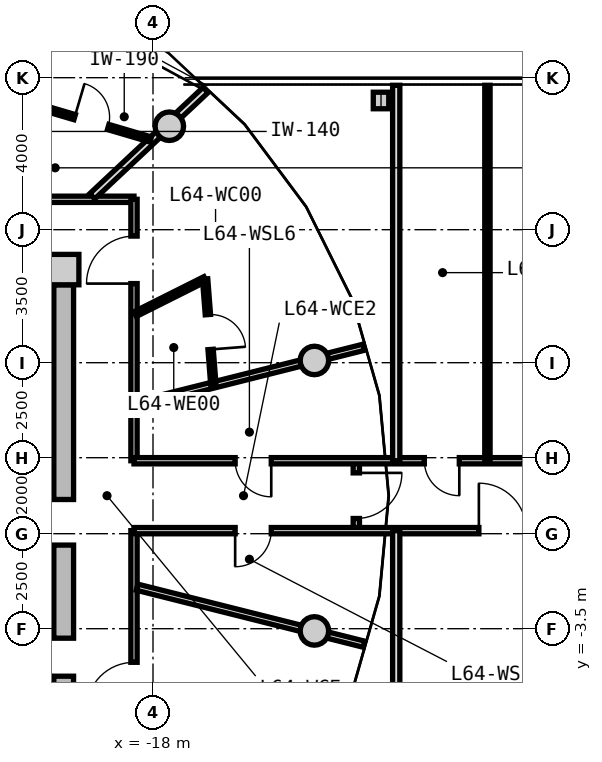
"""IFC4 building model, lengths in metres.
Left out: names, types, materials, properties, quantities, classifications, styles, units other than length and angle.
Written with IfcOpenShell. Run it as: python <this file> out.ifc"""

import sys

from ifc_helpers import new_model, si_unit, direction, frame, frame_2d, origin, origin_2d, place, context, subcontext, project, spatial, rectangle, circle, i_section, extrude, source, transform, mapped, element, fill, save


model = new_model("IFC4")
c1 = context("Model", 3, precision=1e-05, world=origin(), true_north=direction((0.0, 1.0)))
c2 = subcontext(c1, "Body", "Model", "MODEL_VIEW")
j1 = project(units=[si_unit("LENGTHUNIT", "METRE"), si_unit("PLANEANGLEUNIT", "RADIAN")], contexts=[c1])
p1 = place(None, origin())
s1 = spatial("IfcSite", under=j1, at=p1, CompositionType="ELEMENT")
p2 = place(p1, origin())
s2 = spatial("IfcBuilding", under=s1, at=p2, CompositionType="ELEMENT")
p3 = place(p2, frame((0.0, 0.0, 207.8)))
s3 = spatial("IfcBuildingStorey", under=s2, at=p3, CompositionType="ELEMENT", Elevation=207.8)
m1 = source(origin(), c2, "Body", "SweptSolid", [
    extrude(rectangle(XDim=0.8, YDim=0.8, at=origin_2d()), origin(), (0.0, 0.0, 1.0), 3.05),
])
p4 = place(p3, frame((-20.35, 5.95, 0.0), z_axis=(0.0, 0.0, 1.0), x_axis=(1.0, 0.0, 0.0)))
e1 = element("IfcColumn", 1, at=p4, inside=s3, PredefinedType="COLUMN", context=c2, shape_type="MappedRepresentation", body=[
    mapped(m1, transform((0.0, 0.0, 0.0), x_axis=(1.0, 0.0, 0.0), y_axis=(0.0, 1.0, 0.0), z_axis=(0.0, 0.0, 1.0), scale=1.0)),
])
m2 = source(origin(), c2, "Body", "SweptSolid", [
    extrude(rectangle(XDim=11.1, YDim=0.52, at=frame_2d((5.55, 0.0))), origin(), (0.0, 0.0, 1.0), 2.76),
])
p5 = place(p3, frame((-20.35, 5.55, 0.0), z_axis=(0.0, 0.0, 1.0), x_axis=(0.0, -1.0, 0.0)))
e2 = element("IfcWall", 2, at=p5, inside=s3, PredefinedType="SHEAR", context=c2, shape_type="MappedRepresentation", body=[
    mapped(m2, transform((0.0, 0.0, 0.0), x_axis=(1.0, 0.0, 0.0), y_axis=(0.0, 1.0, 0.0), z_axis=(0.0, 0.0, 1.0), scale=1.0)),
])
p6 = place(p5, frame((5.65, 0.0, 0.0)))
e3 = element("IfcOpeningElement", 3, at=p6, cuts=e2, PredefinedType="OPENING", context=c2, shape_type="SweptSolid", body=[
    extrude(rectangle(XDim=1.2, YDim=2.15, at=frame_2d((0.6, 1.075))), frame((0.0, 0.27, 0.0), z_axis=(0.0, -1.0, 0.0), x_axis=(1.0, 0.0, 0.0)), (0.0, 0.0, 1.0), 0.54),
])
p7 = place(p5, frame((9.3, 0.0, 0.0)))
e4 = element("IfcOpeningElement", 4, at=p7, cuts=e2, PredefinedType="OPENING", context=c2, shape_type="SweptSolid", body=[
    extrude(rectangle(XDim=1.0, YDim=2.1, at=frame_2d((0.5, 1.05))), frame((0.0, 0.27, 0.0), z_axis=(0.0, -1.0, 0.0), x_axis=(1.0, 0.0, 0.0)), (0.0, 0.0, 1.0), 0.54),
])
m3 = source(origin(), c2, "Body", "SweptSolid", [
    extrude(circle(Radius=0.375, at=origin_2d()), origin(), (0.0, 0.0, 1.0), 3.05),
])
for number, where, z_axis, x_axis in (
    (5, (-13.753, 3.559, 0.0), (0.0, 0.0, 1.0), (1.0, 0.0, 0.0)),
    (6, (-17.57, 9.723, 0.0), (0.0, 0.0, 1.0), (1.0, 0.0, 0.0)),
    (7, (-13.753, -3.559, 0.0), (0.0, 0.0, 1.0), (1.0, 0.0, 0.0)),
):
    element("IfcColumn", number, at=place(p3, frame(where, z_axis=z_axis, x_axis=x_axis)), inside=s3, PredefinedType="COLUMN", context=c2, shape_type="MappedRepresentation", body=[
        mapped(m3, transform((0.0, 0.0, 0.0), x_axis=(1.0, 0.0, 0.0), y_axis=(0.0, 1.0, 0.0), z_axis=(0.0, 0.0, 1.0), scale=1.0)),
    ])
m4 = source(origin(), c2, "Body", "SweptSolid", [
    extrude(i_section(OverallWidth=0.407, OverallDepth=0.435, WebThickness=0.024, FlangeThickness=0.039, FilletRadius=0.015, at=origin_2d()), origin(), (0.0, 0.0, 1.0), 3.05),
])
p8 = place(p3, frame((-12.0, 10.4, 0.0), z_axis=(0.0, 0.0, 1.0), x_axis=(1.0, 0.0, 0.0)))
e8 = element("IfcColumn", 8, at=p8, inside=s3, PredefinedType="COLUMN", context=c2, shape_type="MappedRepresentation", body=[
    mapped(m4, transform((0.0, 0.0, 0.0), x_axis=(1.0, 0.0, 0.0), y_axis=(0.0, 1.0, 0.0), z_axis=(0.0, 0.0, 1.0), scale=1.0)),
])
m5 = source(origin(), c2, "Body", "SweptSolid", [
    extrude(rectangle(XDim=8.58, YDim=0.165, at=frame_2d((4.29, 0.0))), origin(), (0.0, 0.0, 1.0), 2.745),
])
p9 = place(p3, frame((-27.08, 7.8, 0.0), z_axis=(0.0, 0.0, 1.0), x_axis=(1.0, 0.0, 0.0)))
e9 = element("IfcWall", 9, at=p9, inside=s3, PredefinedType="PARTITIONING", context=c2, shape_type="MappedRepresentation", body=[
    mapped(m5, transform((0.0, 0.0, 0.0), x_axis=(1.0, 0.0, 0.0), y_axis=(0.0, 1.0, 0.0), z_axis=(0.0, 0.0, 1.0), scale=1.0)),
])
p10 = place(p9, frame((2.18, 0.0, 0.0)))
e10 = element("IfcOpeningElement", 10, at=p10, cuts=e9, PredefinedType="OPENING", context=c2, shape_type="SweptSolid", body=[
    extrude(rectangle(XDim=1.25, YDim=2.2, at=frame_2d((0.625, 1.1))), frame((0.0, 0.093, 0.0), z_axis=(0.0, -1.0, 0.0), x_axis=(1.0, 0.0, 0.0)), (0.0, 0.0, 1.0), 0.185),
])
m6 = source(origin(), c2, "Body", "SweptSolid", [
    extrude(rectangle(XDim=6.88, YDim=0.165, at=frame_2d((3.44, 0.0))), origin(), (0.0, 0.0, 1.0), 2.745),
])
p11 = place(p3, frame((-18.5, 7.8, 0.0), z_axis=(0.0, 0.0, 1.0), x_axis=(0.0, -1.0, 0.0)))
e11 = element("IfcWall", 11, at=p11, inside=s3, PredefinedType="PARTITIONING", context=c2, shape_type="MappedRepresentation", body=[
    mapped(m6, transform((0.0, 0.0, 0.0), x_axis=(1.0, 0.0, 0.0), y_axis=(0.0, 1.0, 0.0), z_axis=(0.0, 0.0, 1.0), scale=1.0)),
])
p12 = place(p11, frame((0.968, 0.0, 0.0)))
e12 = element("IfcOpeningElement", 12, at=p12, cuts=e11, PredefinedType="OPENING", context=c2, shape_type="SweptSolid", body=[
    extrude(rectangle(XDim=1.25, YDim=2.2, at=frame_2d((0.625, 1.1))), frame((0.0, 0.093, 0.0), z_axis=(0.0, -1.0, 0.0), x_axis=(1.0, 0.0, 0.0)), (0.0, 0.0, 1.0), 0.185),
])
p13 = place(p3, frame((-18.5, -0.92, 0.0), z_axis=(0.0, 0.0, 1.0), x_axis=(0.0, -1.0, 0.0)))
e13 = element("IfcWall", 13, at=p13, inside=s3, PredefinedType="PARTITIONING", context=c2, shape_type="MappedRepresentation", body=[
    mapped(m6, transform((0.0, 0.0, 0.0), x_axis=(1.0, 0.0, 0.0), y_axis=(0.0, 1.0, 0.0), z_axis=(0.0, 0.0, 1.0), scale=1.0)),
])
p14 = place(p13, frame((3.464, 0.0, 0.0)))
e14 = element("IfcOpeningElement", 14, at=p14, cuts=e13, PredefinedType="OPENING", context=c2, shape_type="SweptSolid", body=[
    extrude(rectangle(XDim=1.25, YDim=2.2, at=frame_2d((0.625, 1.1))), frame((0.0, 0.093, 0.0), z_axis=(0.0, -1.0, 0.0), x_axis=(1.0, 0.0, 0.0)), (0.0, 0.0, 1.0), 0.185),
])
m7 = source(origin(), c2, "Body", "SweptSolid", [
    extrude(rectangle(XDim=6.157, YDim=0.165, at=frame_2d((3.079, 0.0))), origin(), (0.0, 0.0, 1.0), 2.345),
])
for number, where, z_axis, x_axis in (
    (15, (-18.42, -2.407, 0.0), (0.0, 0.0, 1.0), (0.97, -0.244, 0.0)),
    (16, (-18.42, 2.407, 0.0), (0.0, 0.0, 1.0), (0.97, 0.244, 0.0)),
):
    element("IfcWall", number, at=place(p3, frame(where, z_axis=z_axis, x_axis=x_axis)), inside=s3, PredefinedType="PARTITIONING", context=c2, shape_type="MappedRepresentation", body=[
        mapped(m7, transform((0.0, 0.0, 0.0), x_axis=(1.0, 0.0, 0.0), y_axis=(0.0, 1.0, 0.0), z_axis=(0.0, 0.0, 1.0), scale=1.0)),
    ])
m8 = source(origin(), c2, "Body", "SweptSolid", [
    extrude(rectangle(XDim=4.089, YDim=0.19, at=frame_2d((2.044, 0.0))), origin(), (0.0, 0.0, 1.0), 2.345),
])
p15 = place(p3, frame((-19.598, 7.88, 0.0), z_axis=(0.0, 0.0, 1.0), x_axis=(0.729401273609, 0.684086092577, 0.0)))
e17 = element("IfcWall", 17, at=p15, inside=s3, PredefinedType="PARTITIONING", context=c2, shape_type="MappedRepresentation", body=[
    mapped(m8, transform((0.0, 0.0, 0.0), x_axis=(1.0, 0.0, 0.0), y_axis=(0.0, 1.0, 0.0), z_axis=(0.0, 0.0, 1.0), scale=1.0)),
])
m9 = source(origin(), c2, "Body", "SweptSolid", [
    extrude(rectangle(XDim=2.06, YDim=0.14, at=frame_2d((1.03, 0.0))), origin(), (0.0, 0.0, 1.0), 2.745),
])
p16 = place(p3, frame((-18.47, 4.778, 0.0), z_axis=(0.0, 0.0, 1.0), x_axis=(0.893952568722, 0.448161583444, 0.0)))
e18 = element("IfcWall", 18, at=p16, inside=s3, PredefinedType="PARTITIONING", context=c2, shape_type="MappedRepresentation", body=[
    mapped(m9, transform((0.0, 0.0, 0.0), x_axis=(1.0, 0.0, 0.0), y_axis=(0.0, 1.0, 0.0), z_axis=(0.0, 0.0, 1.0), scale=1.0)),
])
m10 = source(origin(), c2, "Body", "SweptSolid", [
    extrude(rectangle(XDim=2.798, YDim=0.14, at=frame_2d((1.399, 0.0))), origin(), (0.0, 0.0, 1.0), 2.745),
])
p17 = place(p3, frame((-16.629, 5.701, 0.0), z_axis=(0.0, 0.0, 1.0), x_axis=(0.077823984089, -0.996967114553, 0.0)))
e19 = element("IfcWall", 19, at=p17, inside=s3, PredefinedType="PARTITIONING", context=c2, shape_type="MappedRepresentation", body=[
    mapped(m10, transform((0.0, 0.0, 0.0), x_axis=(1.0, 0.0, 0.0), y_axis=(0.0, 1.0, 0.0), z_axis=(0.0, 0.0, 1.0), scale=1.0)),
])
p18 = place(p17, frame((0.939, 0.0, 0.0)))
e20 = element("IfcOpeningElement", 20, at=p18, cuts=e19, PredefinedType="OPENING", context=c2, shape_type="SweptSolid", body=[
    extrude(rectangle(XDim=0.92, YDim=2.1, at=frame_2d((0.46, 1.05))), frame((0.0, 0.08, 0.0), z_axis=(0.0, -1.0, 0.0), x_axis=(1.0, 0.0, 0.0)), (0.0, 0.0, 1.0), 0.16),
])
m11 = source(origin(), c2, "Body", "SweptSolid", [
    extrude(rectangle(XDim=3.252, YDim=0.14, at=frame_2d((1.626, 0.0))), origin(), (0.0, 0.0, 1.0), 2.745),
])
p19 = place(p3, frame((-21.18, 10.291, 0.0), z_axis=(0.0, 0.0, 1.0), x_axis=(0.959294945864, -0.282406102695, 0.0)))
e21 = element("IfcWall", 21, at=p19, inside=s3, PredefinedType="PARTITIONING", context=c2, shape_type="MappedRepresentation", body=[
    mapped(m11, transform((0.0, 0.0, 0.0), x_axis=(1.0, 0.0, 0.0), y_axis=(0.0, 1.0, 0.0), z_axis=(0.0, 0.0, 1.0), scale=1.0)),
])
p20 = place(p19, frame((1.166, 0.0, 0.0)))
e22 = element("IfcOpeningElement", 22, at=p20, cuts=e21, PredefinedType="OPENING", context=c2, shape_type="SweptSolid", body=[
    extrude(rectangle(XDim=0.92, YDim=2.1, at=frame_2d((0.46, 1.05))), frame((0.0, 0.08, 0.0), z_axis=(0.0, -1.0, 0.0), x_axis=(1.0, 0.0, 0.0)), (0.0, 0.0, 1.0), 0.16),
])
m12 = source(origin(), c2, "Body", "SweptSolid", [
    extrude(rectangle(XDim=1.84, YDim=0.165, at=frame_2d((0.92, 0.0))), origin(), (0.0, 0.0, 1.0), 2.745),
])
p21 = place(p3, frame((-12.65, -0.92, 0.0), z_axis=(0.0, 0.0, 1.0), x_axis=(0.0, 1.0, 0.0)))
e23 = element("IfcWall", 23, at=p21, inside=s3, PredefinedType="PARTITIONING", context=c2, shape_type="MappedRepresentation", body=[
    mapped(m12, transform((0.0, 0.0, 0.0), x_axis=(1.0, 0.0, 0.0), y_axis=(0.0, 1.0, 0.0), z_axis=(0.0, 0.0, 1.0), scale=1.0)),
])
p22 = place(p21, frame((0.32, 0.0, 0.0)))
e24 = element("IfcOpeningElement", 24, at=p22, cuts=e23, PredefinedType="OPENING", context=c2, shape_type="SweptSolid", body=[
    extrude(rectangle(XDim=1.2, YDim=2.15, at=frame_2d((0.6, 1.075))), frame((0.0, 0.093, 0.0), z_axis=(0.0, -1.0, 0.0), x_axis=(1.0, 0.0, 0.0)), (0.0, 0.0, 1.0), 0.185),
])
m13 = source(origin(), c2, "Body", "SweptSolid", [
    extrude(rectangle(XDim=37.0, YDim=0.165, at=frame_2d((18.5, 0.0))), origin(), (0.0, 0.0, 1.0), 2.745),
])
p23 = place(p3, frame((-18.5, -0.92, 0.0), z_axis=(0.0, 0.0, 1.0), x_axis=(1.0, 0.0, 0.0)))
e25 = element("IfcWall", 25, at=p23, inside=s3, PredefinedType="PARTITIONING", context=c2, shape_type="MappedRepresentation", body=[
    mapped(m13, transform((0.0, 0.0, 0.0), x_axis=(1.0, 0.0, 0.0), y_axis=(0.0, 1.0, 0.0), z_axis=(0.0, 0.0, 1.0), scale=1.0)),
])
p24 = place(p23, frame((2.662, 0.0, 0.0)))
e26 = element("IfcOpeningElement", 26, at=p24, cuts=e25, PredefinedType="OPENING", context=c2, shape_type="SweptSolid", body=[
    extrude(rectangle(XDim=0.95, YDim=2.1, at=frame_2d((0.475, 1.05))), frame((0.0, 0.093, 0.0), z_axis=(0.0, -1.0, 0.0), x_axis=(1.0, 0.0, 0.0)), (0.0, 0.0, 1.0), 0.185),
])
p25 = place(p23, frame((33.388, 0.0, 0.0)))
e27 = element("IfcOpeningElement", 27, at=p25, cuts=e25, PredefinedType="OPENING", context=c2, shape_type="SweptSolid", body=[
    extrude(rectangle(XDim=0.95, YDim=2.1, at=frame_2d((0.475, 1.05))), frame((0.0, 0.093, 0.0), z_axis=(0.0, -1.0, 0.0), x_axis=(1.0, 0.0, 0.0)), (0.0, 0.0, 1.0), 0.185),
])
p26 = place(p23, frame((9.075, 0.0, 0.0)))
e28 = element("IfcOpeningElement", 28, at=p26, cuts=e25, PredefinedType="OPENING", context=c2, shape_type="SweptSolid", body=[
    extrude(rectangle(XDim=1.25, YDim=2.2, at=frame_2d((0.625, 1.1))), frame((0.0, 0.093, 0.0), z_axis=(0.0, -1.0, 0.0), x_axis=(1.0, 0.0, 0.0)), (0.0, 0.0, 1.0), 0.185),
])
p27 = place(p23, frame((14.875, 0.0, 0.0)))
e29 = element("IfcOpeningElement", 29, at=p27, cuts=e25, PredefinedType="OPENING", context=c2, shape_type="SweptSolid", body=[
    extrude(rectangle(XDim=1.25, YDim=2.2, at=frame_2d((0.625, 1.1))), frame((0.0, 0.093, 0.0), z_axis=(0.0, -1.0, 0.0), x_axis=(1.0, 0.0, 0.0)), (0.0, 0.0, 1.0), 0.185),
])
p28 = place(p23, frame((20.875, 0.0, 0.0)))
e30 = element("IfcOpeningElement", 30, at=p28, cuts=e25, PredefinedType="OPENING", context=c2, shape_type="SweptSolid", body=[
    extrude(rectangle(XDim=1.25, YDim=2.2, at=frame_2d((0.625, 1.1))), frame((0.0, 0.093, 0.0), z_axis=(0.0, -1.0, 0.0), x_axis=(1.0, 0.0, 0.0)), (0.0, 0.0, 1.0), 0.185),
])
p29 = place(p23, frame((26.675, 0.0, 0.0)))
e31 = element("IfcOpeningElement", 31, at=p29, cuts=e25, PredefinedType="OPENING", context=c2, shape_type="SweptSolid", body=[
    extrude(rectangle(XDim=1.25, YDim=2.2, at=frame_2d((0.625, 1.1))), frame((0.0, 0.093, 0.0), z_axis=(0.0, -1.0, 0.0), x_axis=(1.0, 0.0, 0.0)), (0.0, 0.0, 1.0), 0.185),
])
p30 = place(p3, frame((-18.5, 0.92, 0.0), z_axis=(0.0, 0.0, 1.0), x_axis=(1.0, 0.0, 0.0)))
e32 = element("IfcWall", 32, at=p30, inside=s3, PredefinedType="PARTITIONING", context=c2, shape_type="MappedRepresentation", body=[
    mapped(m13, transform((0.0, 0.0, 0.0), x_axis=(1.0, 0.0, 0.0), y_axis=(0.0, 1.0, 0.0), z_axis=(0.0, 0.0, 1.0), scale=1.0)),
])
p31 = place(p30, frame((2.662, 0.0, 0.0)))
e33 = element("IfcOpeningElement", 33, at=p31, cuts=e32, PredefinedType="OPENING", context=c2, shape_type="SweptSolid", body=[
    extrude(rectangle(XDim=0.95, YDim=2.1, at=frame_2d((0.475, 1.05))), frame((0.0, 0.093, 0.0), z_axis=(0.0, -1.0, 0.0), x_axis=(1.0, 0.0, 0.0)), (0.0, 0.0, 1.0), 0.185),
])
p32 = place(p30, frame((33.388, 0.0, 0.0)))
e34 = element("IfcOpeningElement", 34, at=p32, cuts=e32, PredefinedType="OPENING", context=c2, shape_type="SweptSolid", body=[
    extrude(rectangle(XDim=0.95, YDim=2.1, at=frame_2d((0.475, 1.05))), frame((0.0, 0.093, 0.0), z_axis=(0.0, -1.0, 0.0), x_axis=(1.0, 0.0, 0.0)), (0.0, 0.0, 1.0), 0.185),
])
p33 = place(p30, frame((7.64, 0.0, 0.0)))
e35 = element("IfcOpeningElement", 35, at=p33, cuts=e32, PredefinedType="OPENING", context=c2, shape_type="SweptSolid", body=[
    extrude(rectangle(XDim=0.92, YDim=2.1, at=frame_2d((0.46, 1.05))), frame((0.0, 0.093, 0.0), z_axis=(0.0, -1.0, 0.0), x_axis=(1.0, 0.0, 0.0)), (0.0, 0.0, 1.0), 0.185),
])
p34 = place(p30, frame((10.275, 0.0, 0.0)))
e36 = element("IfcOpeningElement", 36, at=p34, cuts=e32, PredefinedType="OPENING", context=c2, shape_type="SweptSolid", body=[
    extrude(rectangle(XDim=1.25, YDim=2.2, at=frame_2d((0.625, 1.1))), frame((0.0, 0.093, 0.0), z_axis=(0.0, -1.0, 0.0), x_axis=(1.0, 0.0, 0.0)), (0.0, 0.0, 1.0), 0.185),
])
p35 = place(p30, frame((14.875, 0.0, 0.0)))
e37 = element("IfcOpeningElement", 37, at=p35, cuts=e32, PredefinedType="OPENING", context=c2, shape_type="SweptSolid", body=[
    extrude(rectangle(XDim=1.25, YDim=2.2, at=frame_2d((0.625, 1.1))), frame((0.0, 0.093, 0.0), z_axis=(0.0, -1.0, 0.0), x_axis=(1.0, 0.0, 0.0)), (0.0, 0.0, 1.0), 0.185),
])
p36 = place(p30, frame((20.875, 0.0, 0.0)))
e38 = element("IfcOpeningElement", 38, at=p36, cuts=e32, PredefinedType="OPENING", context=c2, shape_type="SweptSolid", body=[
    extrude(rectangle(XDim=1.25, YDim=2.2, at=frame_2d((0.625, 1.1))), frame((0.0, 0.093, 0.0), z_axis=(0.0, -1.0, 0.0), x_axis=(1.0, 0.0, 0.0)), (0.0, 0.0, 1.0), 0.185),
])
p37 = place(p30, frame((26.675, 0.0, 0.0)))
e39 = element("IfcOpeningElement", 39, at=p37, cuts=e32, PredefinedType="OPENING", context=c2, shape_type="SweptSolid", body=[
    extrude(rectangle(XDim=1.25, YDim=2.2, at=frame_2d((0.625, 1.1))), frame((0.0, 0.093, 0.0), z_axis=(0.0, -1.0, 0.0), x_axis=(1.0, 0.0, 0.0)), (0.0, 0.0, 1.0), 0.185),
])
m14 = source(origin(), c2, "Body", "SweptSolid", [
    extrude(rectangle(XDim=9.88, YDim=0.19, at=frame_2d((4.94, 0.0))), origin(), (0.0, 0.0, 1.0), 2.745),
])
for number, where, z_axis, x_axis in (
    (40, (-11.6, -10.8, 0.0), (0.0, 0.0, 1.0), (0.0, 1.0, 0.0)),
    (41, (-11.6, 0.92, 0.0), (0.0, 0.0, 1.0), (0.0, 1.0, 0.0)),
):
    element("IfcWall", number, at=place(p3, frame(where, z_axis=z_axis, x_axis=x_axis)), inside=s3, PredefinedType="PARTITIONING", context=c2, shape_type="MappedRepresentation", body=[
        mapped(m14, transform((0.0, 0.0, 0.0), x_axis=(1.0, 0.0, 0.0), y_axis=(0.0, 1.0, 0.0), z_axis=(0.0, 0.0, 1.0), scale=1.0)),
    ])
m15 = source(origin(), c2, "Body", "SweptSolid", [
    extrude(rectangle(XDim=9.88, YDim=0.14, at=frame_2d((4.94, 0.0))), origin(), (0.0, 0.0, 1.0), 2.745),
])
p38 = place(p3, frame((-9.2, 0.92, 0.0), z_axis=(0.0, 0.0, 1.0), x_axis=(0.0, 1.0, 0.0)))
e42 = element("IfcWall", 42, at=p38, inside=s3, PredefinedType="PARTITIONING", context=c2, shape_type="MappedRepresentation", body=[
    mapped(m15, transform((0.0, 0.0, 0.0), x_axis=(1.0, 0.0, 0.0), y_axis=(0.0, 1.0, 0.0), z_axis=(0.0, 0.0, 1.0), scale=1.0)),
])
m16 = source(origin(), c2, "Body", "SweptSolid", [
    extrude(rectangle(XDim=1.2, YDim=2.15, at=frame_2d((0.6, 1.075))), frame((0.0, 0.025, 0.0), z_axis=(0.0, -1.0, 0.0), x_axis=(1.0, 0.0, 0.0)), (0.0, 0.0, 1.0), 0.05),
])
p39 = place(p6, frame((1.2, 0.0, 0.0), z_axis=(0.0, 0.0, 1.0), x_axis=(-1.0, 0.0, 0.0)))
e43 = element("IfcDoor", 43, at=p39, inside=s3, OperationType="SINGLE_SWING_RIGHT", PredefinedType="DOOR", context=c2, shape_type="MappedRepresentation", body=[
    mapped(m16, transform((0.0, 0.0, 0.0), x_axis=(1.0, 0.0, 0.0), y_axis=(0.0, 1.0, 0.0), z_axis=(0.0, 0.0, 1.0), scale=1.0)),
])
fill(e3, e43)
m17 = source(origin(), c2, "Body", "SweptSolid", [
    extrude(rectangle(XDim=1.0, YDim=2.1, at=frame_2d((0.5, 1.05))), frame((0.0, 0.025, 0.0), z_axis=(0.0, -1.0, 0.0), x_axis=(1.0, 0.0, 0.0)), (0.0, 0.0, 1.0), 0.05),
])
p40 = place(p7, frame((1.0, 0.0, 0.0), z_axis=(0.0, 0.0, 1.0), x_axis=(-1.0, 0.0, 0.0)))
e44 = element("IfcDoor", 44, at=p40, inside=s3, OperationType="SINGLE_SWING_RIGHT", PredefinedType="DOOR", context=c2, shape_type="MappedRepresentation", body=[
    mapped(m17, transform((0.0, 0.0, 0.0), x_axis=(1.0, 0.0, 0.0), y_axis=(0.0, 1.0, 0.0), z_axis=(0.0, 0.0, 1.0), scale=1.0)),
])
fill(e4, e44)
m18 = source(origin(), c2, "Body", "SweptSolid", [
    extrude(rectangle(XDim=0.95, YDim=2.1, at=frame_2d((0.475, 1.05))), frame((0.0, 0.025, 0.0), z_axis=(0.0, -1.0, 0.0), x_axis=(1.0, 0.0, 0.0)), (0.0, 0.0, 1.0), 0.05),
])
p41 = place(p24, frame((0.95, 0.0, 0.0), z_axis=(0.0, 0.0, 1.0), x_axis=(-1.0, 0.0, 0.0)))
e45 = element("IfcDoor", 45, at=p41, inside=s3, OperationType="SINGLE_SWING_RIGHT", PredefinedType="DOOR", context=c2, shape_type="MappedRepresentation", body=[
    mapped(m18, transform((0.0, 0.0, 0.0), x_axis=(1.0, 0.0, 0.0), y_axis=(0.0, 1.0, 0.0), z_axis=(0.0, 0.0, 1.0), scale=1.0)),
])
fill(e26, e45)
p42 = place(p31, frame((0.95, 0.0, 0.0), z_axis=(0.0, 0.0, 1.0), x_axis=(-1.0, 0.0, 0.0)))
e46 = element("IfcDoor", 46, at=p42, inside=s3, OperationType="SINGLE_SWING_LEFT", PredefinedType="DOOR", context=c2, shape_type="MappedRepresentation", body=[
    mapped(m18, transform((0.0, 0.0, 0.0), x_axis=(1.0, 0.0, 0.0), y_axis=(0.0, 1.0, 0.0), z_axis=(0.0, 0.0, 1.0), scale=1.0)),
])
fill(e33, e46)
m19 = source(origin(), c2, "Body", "SweptSolid", [
    extrude(rectangle(XDim=1.25, YDim=2.2, at=frame_2d((0.625, 1.1))), frame((0.0, 0.025, 0.0), z_axis=(0.0, -1.0, 0.0), x_axis=(1.0, 0.0, 0.0)), (0.0, 0.0, 1.0), 0.05),
])
p43 = place(p12, frame((1.25, 0.0, 0.0), z_axis=(0.0, 0.0, 1.0), x_axis=(-1.0, 0.0, 0.0)))
e47 = element("IfcDoor", 47, at=p43, inside=s3, OperationType="SINGLE_SWING_LEFT", PredefinedType="DOOR", context=c2, shape_type="MappedRepresentation", body=[
    mapped(m19, transform((0.0, 0.0, 0.0), x_axis=(1.0, 0.0, 0.0), y_axis=(0.0, 1.0, 0.0), z_axis=(0.0, 0.0, 1.0), scale=1.0)),
])
fill(e12, e47)
m20 = source(origin(), c2, "Body", "SweptSolid", [
    extrude(rectangle(XDim=0.92, YDim=2.1, at=frame_2d((0.46, 1.05))), frame((0.0, 0.025, 0.0), z_axis=(0.0, -1.0, 0.0), x_axis=(1.0, 0.0, 0.0)), (0.0, 0.0, 1.0), 0.05),
])
p44 = place(p18, origin())
e48 = element("IfcDoor", 48, at=p44, inside=s3, OperationType="SINGLE_SWING_RIGHT", PredefinedType="DOOR", context=c2, shape_type="MappedRepresentation", body=[
    mapped(m20, transform((0.0, 0.0, 0.0), x_axis=(1.0, 0.0, 0.0), y_axis=(0.0, 1.0, 0.0), z_axis=(0.0, 0.0, 1.0), scale=1.0)),
])
fill(e20, e48)
p45 = place(p20, origin())
e49 = element("IfcDoor", 49, at=p45, inside=s3, OperationType="SINGLE_SWING_LEFT", PredefinedType="DOOR", context=c2, shape_type="MappedRepresentation", body=[
    mapped(m20, transform((0.0, 0.0, 0.0), x_axis=(1.0, 0.0, 0.0), y_axis=(0.0, 1.0, 0.0), z_axis=(0.0, 0.0, 1.0), scale=1.0)),
])
fill(e22, e49)
p46 = place(p14, frame((1.25, 0.0, 0.0), z_axis=(0.0, 0.0, 1.0), x_axis=(-1.0, 0.0, 0.0)))
e50 = element("IfcDoor", 50, at=p46, inside=s3, OperationType="SINGLE_SWING_LEFT", PredefinedType="DOOR", context=c2, shape_type="MappedRepresentation", body=[
    mapped(m19, transform((0.0, 0.0, 0.0), x_axis=(1.0, 0.0, 0.0), y_axis=(0.0, 1.0, 0.0), z_axis=(0.0, 0.0, 1.0), scale=1.0)),
])
fill(e14, e50)
p47 = place(p22, frame((1.2, 0.0, 0.0), z_axis=(0.0, 0.0, 1.0), x_axis=(-1.0, 0.0, 0.0)))
e51 = element("IfcDoor", 51, at=p47, inside=s3, OperationType="SINGLE_SWING_LEFT", PredefinedType="DOOR", context=c2, shape_type="MappedRepresentation", body=[
    mapped(m16, transform((0.0, 0.0, 0.0), x_axis=(1.0, 0.0, 0.0), y_axis=(0.0, 1.0, 0.0), z_axis=(0.0, 0.0, 1.0), scale=1.0)),
])
fill(e24, e51)
p48 = place(p26, origin())
e52 = element("IfcDoor", 52, at=p48, inside=s3, OperationType="SINGLE_SWING_LEFT", PredefinedType="DOOR", context=c2, shape_type="MappedRepresentation", body=[
    mapped(m19, transform((0.0, 0.0, 0.0), x_axis=(1.0, 0.0, 0.0), y_axis=(0.0, 1.0, 0.0), z_axis=(0.0, 0.0, 1.0), scale=1.0)),
])
fill(e28, e52)
p49 = place(p33, frame((0.92, 0.0, 0.0), z_axis=(0.0, 0.0, 1.0), x_axis=(-1.0, 0.0, 0.0)))
e53 = element("IfcDoor", 53, at=p49, inside=s3, OperationType="SINGLE_SWING_LEFT", PredefinedType="DOOR", context=c2, shape_type="MappedRepresentation", body=[
    mapped(m20, transform((0.0, 0.0, 0.0), x_axis=(1.0, 0.0, 0.0), y_axis=(0.0, 1.0, 0.0), z_axis=(0.0, 0.0, 1.0), scale=1.0)),
])
fill(e35, e53)
save(model, sys.argv[1])
